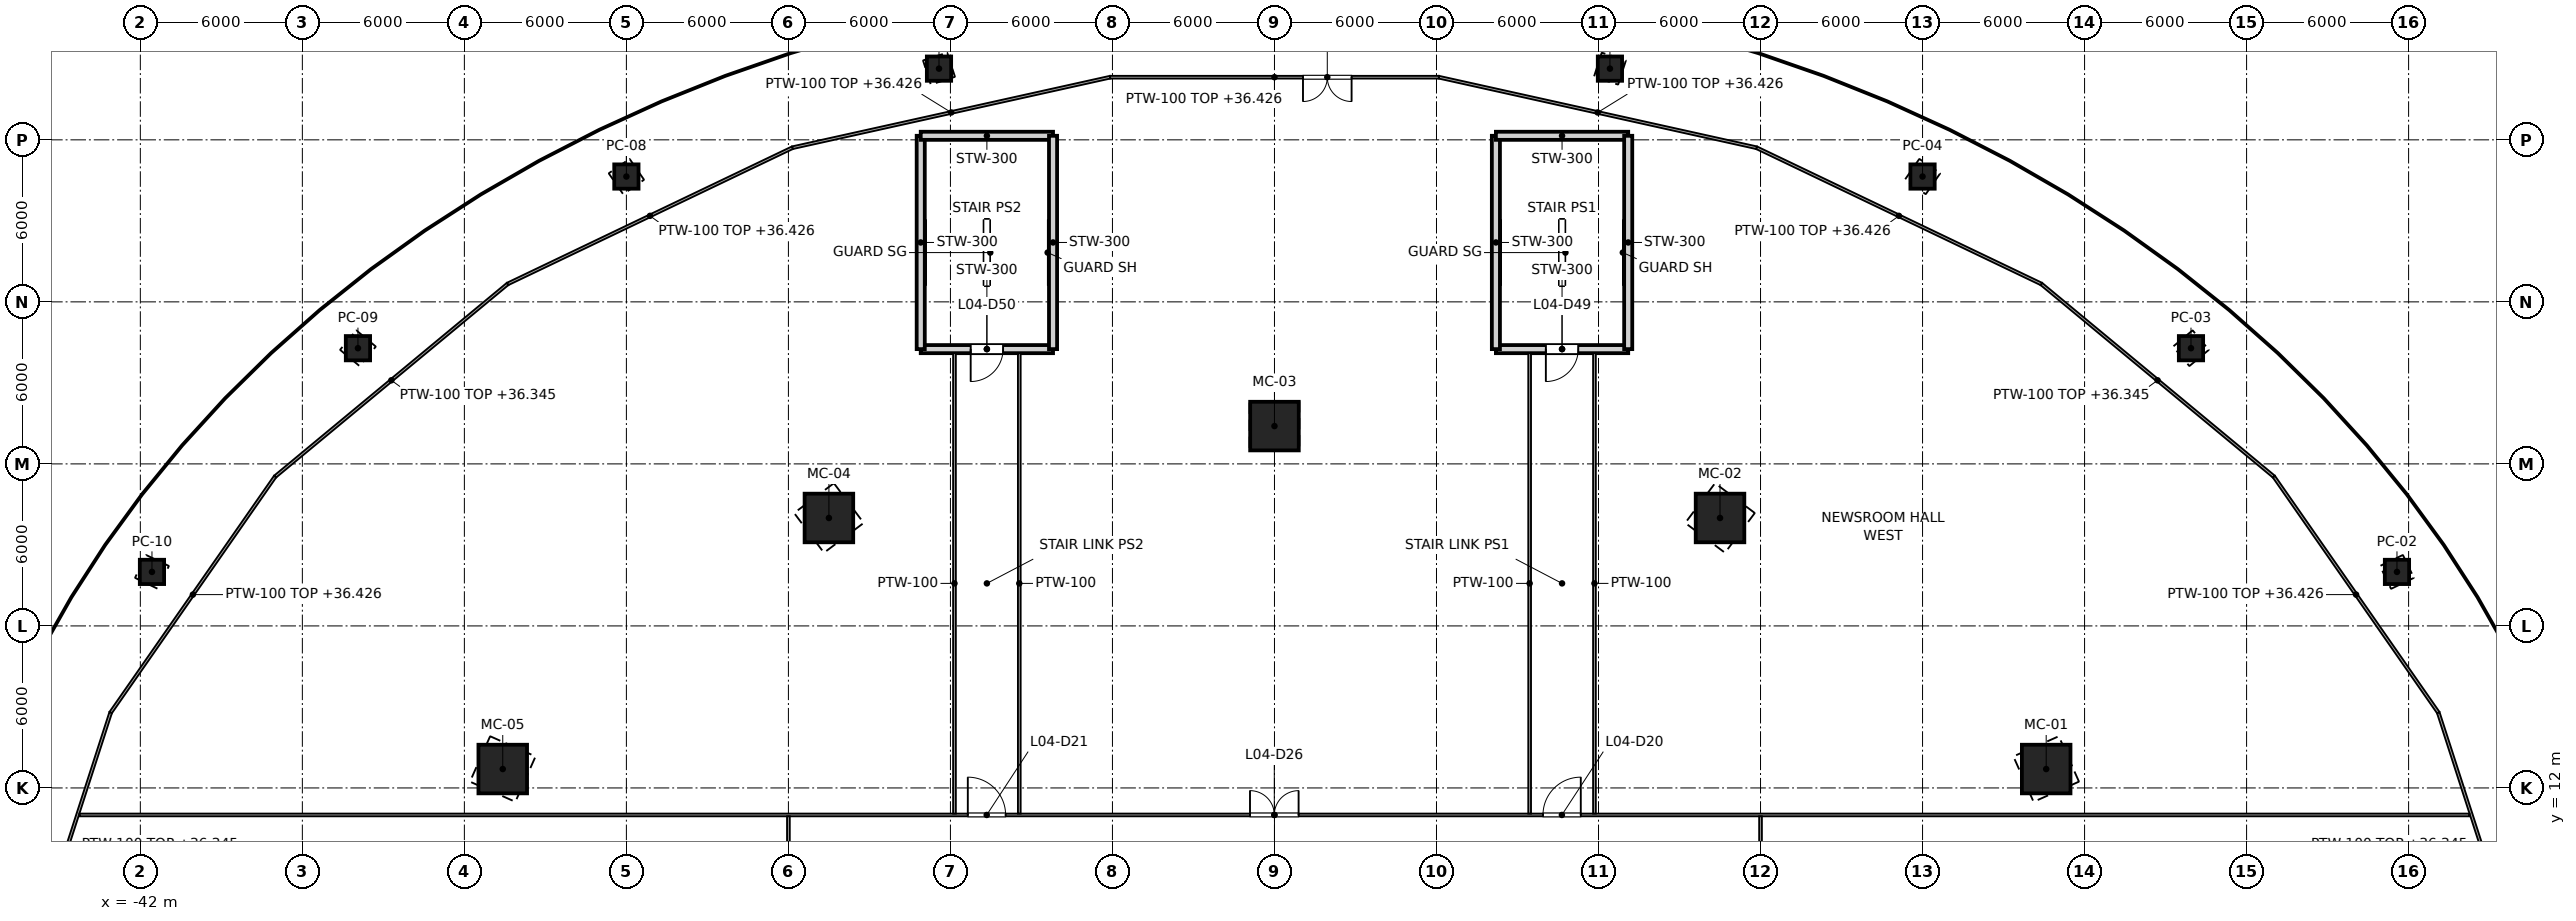
"""IFC4 building model, lengths in metres.
Left out: names, types, materials, properties, quantities, classifications, styles, units other than length and angle.
Written with IfcOpenShell. Run it as: python <this file> out.ifc"""

import sys

from ifc_helpers import new_model, si_unit, direction, frame, frame_2d, origin, origin_2d, place, context, subcontext, project, spatial, rectangle, hollow_rectangle, extrude, element, fill, save


model = new_model("IFC4")
c1 = context("Model", 3, precision=1e-05, world=origin(), true_north=direction((0.0, 1.0)))
c2 = subcontext(c1, "Body", "Model", "MODEL_VIEW")
j1 = project(units=[si_unit("LENGTHUNIT", "METRE"), si_unit("PLANEANGLEUNIT", "RADIAN")], contexts=[c1])
p1 = place(None, origin())
s1 = spatial("IfcSite", under=j1, at=p1, CompositionType="ELEMENT")
p2 = place(p1, origin())
s2 = spatial("IfcBuilding", under=s1, at=p2, CompositionType="ELEMENT")
p3 = place(p2, frame((0.0, 0.0, 31.4)))
s3 = spatial("IfcBuildingStorey", under=s2, at=p3, CompositionType="ELEMENT", Elevation=31.4)
for number, where, z_axis, x_axis in (
    (1, (28.579, 12.7, 0.0), (0.0, 0.0, 1.0), (0.914, 0.406, 0.0)),
    (2, (16.5, 21.997, 0.0), (0.0, 0.0, 1.0), (0.6, 0.8, 0.0)),
    (3, (0.0, 25.4, 0.0), (0.0, 0.0, 1.0), (0.0, 1.0, 0.0)),
    (4, (-16.5, 21.997, 0.0), (0.0, 0.0, 1.0), (-0.6, 0.8, 0.0)),
    (5, (-28.579, 12.7, 0.0), (0.0, 0.0, 1.0), (-0.914, 0.406, 0.0)),
):
    element("IfcColumn", number, at=place(p3, frame(where, z_axis=z_axis, x_axis=x_axis)), inside=s3, PredefinedType="COLUMN", context=c2, shape_type="SweptSolid", body=[
        extrude(hollow_rectangle(XDim=1.8, YDim=1.8, WallThickness=0.08, at=origin_2d()), origin(), (0.0, 0.0, 1.0), 6.0),
    ])
for number, where, z_axis, x_axis in (
    (6, (41.569, 20.0, 0.0), (0.0, 0.0, 1.0), (0.901, 0.434, 0.0)),
    (7, (33.941, 28.284, 0.0), (0.0, 0.0, 1.0), (0.768, 0.64, 0.0)),
    (8, (24.0, 34.641, 0.0), (0.0, 0.0, 1.0), (0.569, 0.822, 0.0)),
    (9, (12.423, 38.637, 0.0), (0.0, 0.0, 1.0), (0.306, 0.952, 0.0)),
    (10, (-12.423, 38.637, 0.0), (0.0, 0.0, 1.0), (-0.306, 0.952, 0.0)),
    (11, (-24.0, 34.641, 0.0), (0.0, 0.0, 1.0), (-0.569, 0.822, 0.0)),
    (12, (-33.941, 28.284, 0.0), (0.0, 0.0, 1.0), (-0.768, 0.64, 0.0)),
    (13, (-41.569, 20.0, 0.0), (0.0, 0.0, 1.0), (-0.901, 0.434, 0.0)),
):
    element("IfcColumn", number, at=place(p3, frame(where, z_axis=z_axis, x_axis=x_axis)), inside=s3, PredefinedType="COLUMN", context=c2, shape_type="SweptSolid", body=[
        extrude(hollow_rectangle(XDim=0.9, YDim=0.9, WallThickness=0.04, at=origin_2d()), origin(), (0.0, 0.0, 1.0), 6.0),
    ])
p4 = place(p3, frame((13.1, 28.25, 0.0), z_axis=(0.0, 0.0, 1.0), x_axis=(-1.0, 0.0, 0.0)))
e14 = element("IfcWall", 14, at=p4, inside=s3, PredefinedType="SOLIDWALL", context=c2, shape_type="SweptSolid", body=[
    extrude(rectangle(XDim=4.9, YDim=0.3, at=frame_2d((2.45, 0.0))), origin(), (0.0, 0.0, 1.0), 5.8),
])
p5 = place(p4, frame((1.85, 0.0, 0.0)))
e15 = element("IfcOpeningElement", 15, at=p5, cuts=e14, PredefinedType="OPENING", context=c2, shape_type="SweptSolid", body=[
    extrude(rectangle(XDim=1.2, YDim=2.1, at=frame_2d((0.6, 1.05))), frame((0.0, 0.15, 0.0), z_axis=(0.0, -1.0, 0.0), x_axis=(1.0, 0.0, 0.0)), (0.0, 0.0, 1.0), 0.3),
])
p6 = place(p3, frame((8.2, 28.25, 0.0), z_axis=(0.0, 0.0, 1.0), x_axis=(0.0, 1.0, 0.0)))
e16 = element("IfcWall", 16, at=p6, inside=s3, PredefinedType="SOLIDWALL", context=c2, shape_type="SweptSolid", body=[
    extrude(rectangle(XDim=7.9, YDim=0.3, at=frame_2d((3.95, 0.0))), origin(), (0.0, 0.0, 1.0), 5.8),
])
p7 = place(p3, frame((8.2, 36.15, 0.0), z_axis=(0.0, 0.0, 1.0), x_axis=(1.0, 0.0, 0.0)))
e17 = element("IfcWall", 17, at=p7, inside=s3, PredefinedType="SOLIDWALL", context=c2, shape_type="SweptSolid", body=[
    extrude(rectangle(XDim=4.9, YDim=0.3, at=frame_2d((2.45, 0.0))), origin(), (0.0, 0.0, 1.0), 5.8),
])
p8 = place(p3, frame((13.1, 36.15, 0.0), z_axis=(0.0, 0.0, 1.0), x_axis=(0.0, -1.0, 0.0)))
e18 = element("IfcWall", 18, at=p8, inside=s3, PredefinedType="SOLIDWALL", context=c2, shape_type="SweptSolid", body=[
    extrude(rectangle(XDim=7.9, YDim=0.3, at=frame_2d((3.95, 0.0))), origin(), (0.0, 0.0, 1.0), 5.8),
])
p9 = place(p3, frame((-8.2, 28.25, 0.0), z_axis=(0.0, 0.0, 1.0), x_axis=(-1.0, 0.0, 0.0)))
e19 = element("IfcWall", 19, at=p9, inside=s3, PredefinedType="SOLIDWALL", context=c2, shape_type="SweptSolid", body=[
    extrude(rectangle(XDim=4.9, YDim=0.3, at=frame_2d((2.45, 0.0))), origin(), (0.0, 0.0, 1.0), 5.8),
])
p10 = place(p9, frame((1.85, 0.0, 0.0)))
e20 = element("IfcOpeningElement", 20, at=p10, cuts=e19, PredefinedType="OPENING", context=c2, shape_type="SweptSolid", body=[
    extrude(rectangle(XDim=1.2, YDim=2.1, at=frame_2d((0.6, 1.05))), frame((0.0, 0.15, 0.0), z_axis=(0.0, -1.0, 0.0), x_axis=(1.0, 0.0, 0.0)), (0.0, 0.0, 1.0), 0.3),
])
p11 = place(p3, frame((-13.1, 28.25, 0.0), z_axis=(0.0, 0.0, 1.0), x_axis=(0.0, 1.0, 0.0)))
e21 = element("IfcWall", 21, at=p11, inside=s3, PredefinedType="SOLIDWALL", context=c2, shape_type="SweptSolid", body=[
    extrude(rectangle(XDim=7.9, YDim=0.3, at=frame_2d((3.95, 0.0))), origin(), (0.0, 0.0, 1.0), 5.8),
])
p12 = place(p3, frame((-13.1, 36.15, 0.0), z_axis=(0.0, 0.0, 1.0), x_axis=(1.0, 0.0, 0.0)))
e22 = element("IfcWall", 22, at=p12, inside=s3, PredefinedType="SOLIDWALL", context=c2, shape_type="SweptSolid", body=[
    extrude(rectangle(XDim=4.9, YDim=0.3, at=frame_2d((2.45, 0.0))), origin(), (0.0, 0.0, 1.0), 5.8),
])
p13 = place(p3, frame((-8.2, 36.15, 0.0), z_axis=(0.0, 0.0, 1.0), x_axis=(0.0, -1.0, 0.0)))
e23 = element("IfcWall", 23, at=p13, inside=s3, PredefinedType="SOLIDWALL", context=c2, shape_type="SweptSolid", body=[
    extrude(rectangle(XDim=7.9, YDim=0.3, at=frame_2d((3.95, 0.0))), origin(), (0.0, 0.0, 1.0), 5.8),
])
p14 = place(p3, frame((46.251, 5.045, 0.0), z_axis=(0.0, 0.0, 1.0), x_axis=(-0.307713034182, 0.951479210805, 0.0)))
e24 = element("IfcWall", 24, at=p14, inside=s3, PredefinedType="PARTITIONING", context=c2, shape_type="SweptSolid", body=[
    extrude(rectangle(XDim=10.243, YDim=0.1, at=frame_2d((5.122, 0.0))), origin(), (0.0, 0.0, 1.0), 4.945),
])
p15 = place(p14, frame((3.2, 0.0, 0.0)))
e25 = element("IfcOpeningElement", 25, at=p15, cuts=e24, PredefinedType="OPENING", context=c2, shape_type="SweptSolid", body=[
    extrude(rectangle(XDim=0.9, YDim=2.1, at=frame_2d((0.45, 1.05))), frame((0.0, 0.05, 0.0), z_axis=(0.0, -1.0, 0.0), x_axis=(1.0, 0.0, 0.0)), (0.0, 0.0, 1.0), 0.1),
])
p16 = place(p3, frame((43.099, 14.791, 0.0), z_axis=(0.0, 0.0, 1.0), x_axis=(-0.571737958261, 0.820436290692, 0.0)))
e26 = element("IfcWall", 26, at=p16, inside=s3, PredefinedType="PARTITIONING", context=c2, shape_type="SweptSolid", body=[
    extrude(rectangle(XDim=10.65, YDim=0.1, at=frame_2d((5.325, 0.0))), origin(), (0.0, 0.0, 1.0), 5.026),
])
p17 = place(p3, frame((37.01, 23.529, 0.0), z_axis=(0.0, 0.0, 1.0), x_axis=(-0.770046995363, 0.637987166746, 0.0)))
e27 = element("IfcWall", 27, at=p17, inside=s3, PredefinedType="PARTITIONING", context=c2, shape_type="SweptSolid", body=[
    extrude(rectangle(XDim=11.183, YDim=0.1, at=frame_2d((5.591, 0.0))), origin(), (0.0, 0.0, 1.0), 4.945),
])
p18 = place(p3, frame((28.399, 30.663, 0.0), z_axis=(0.0, 0.0, 1.0), x_axis=(-0.902100999032, 0.431524955878, 0.0)))
e28 = element("IfcWall", 28, at=p18, inside=s3, PredefinedType="PARTITIONING", context=c2, shape_type="SweptSolid", body=[
    extrude(rectangle(XDim=11.691, YDim=0.1, at=frame_2d((5.845, 0.0))), origin(), (0.0, 0.0, 1.0), 5.026),
])
p19 = place(p3, frame((17.852, 35.708, 0.0), z_axis=(0.0, 0.0, 1.0), x_axis=(-0.97623471049, 0.216715920124, 0.0)))
e29 = element("IfcWall", 29, at=p19, inside=s3, PredefinedType="PARTITIONING", context=c2, shape_type="SweptSolid", body=[
    extrude(rectangle(XDim=12.05, YDim=0.1, at=frame_2d((6.025, 0.0))), origin(), (0.0, 0.0, 1.0), 5.026),
])
p20 = place(p3, frame((6.089, 38.319, 0.0), z_axis=(0.0, 0.0, 1.0), x_axis=(-1.0, 0.0, 0.0)))
e30 = element("IfcWall", 30, at=p20, inside=s3, PredefinedType="PARTITIONING", context=c2, shape_type="SweptSolid", body=[
    extrude(rectangle(XDim=12.178, YDim=0.1, at=frame_2d((6.089, 0.0))), origin(), (0.0, 0.0, 1.0), 5.026),
])
p21 = place(p20, frame((3.233, 0.0, 0.0)))
e31 = element("IfcOpeningElement", 31, at=p21, cuts=e30, PredefinedType="OPENING", context=c2, shape_type="SweptSolid", body=[
    extrude(rectangle(XDim=1.8, YDim=2.1, at=frame_2d((0.9, 1.05))), frame((0.0, 0.05, 0.0), z_axis=(0.0, -1.0, 0.0), x_axis=(1.0, 0.0, 0.0)), (0.0, 0.0, 1.0), 0.1),
])
p22 = place(p3, frame((-6.089, 38.319, 0.0), z_axis=(0.0, 0.0, 1.0), x_axis=(-0.97623471049, -0.216715920124, 0.0)))
e32 = element("IfcWall", 32, at=p22, inside=s3, PredefinedType="PARTITIONING", context=c2, shape_type="SweptSolid", body=[
    extrude(rectangle(XDim=12.05, YDim=0.1, at=frame_2d((6.025, 0.0))), origin(), (0.0, 0.0, 1.0), 5.026),
])
p23 = place(p3, frame((-17.852, 35.708, 0.0), z_axis=(0.0, 0.0, 1.0), x_axis=(-0.902100999032, -0.431524955878, 0.0)))
e33 = element("IfcWall", 33, at=p23, inside=s3, PredefinedType="PARTITIONING", context=c2, shape_type="SweptSolid", body=[
    extrude(rectangle(XDim=11.691, YDim=0.1, at=frame_2d((5.845, 0.0))), origin(), (0.0, 0.0, 1.0), 5.026),
])
p24 = place(p3, frame((-28.399, 30.663, 0.0), z_axis=(0.0, 0.0, 1.0), x_axis=(-0.770046995363, -0.637987166746, 0.0)))
e34 = element("IfcWall", 34, at=p24, inside=s3, PredefinedType="PARTITIONING", context=c2, shape_type="SweptSolid", body=[
    extrude(rectangle(XDim=11.183, YDim=0.1, at=frame_2d((5.591, 0.0))), origin(), (0.0, 0.0, 1.0), 4.945),
])
p25 = place(p3, frame((-37.01, 23.529, 0.0), z_axis=(0.0, 0.0, 1.0), x_axis=(-0.571737958261, -0.820436290692, 0.0)))
e35 = element("IfcWall", 35, at=p25, inside=s3, PredefinedType="PARTITIONING", context=c2, shape_type="SweptSolid", body=[
    extrude(rectangle(XDim=10.65, YDim=0.1, at=frame_2d((5.325, 0.0))), origin(), (0.0, 0.0, 1.0), 5.026),
])
p26 = place(p3, frame((-43.099, 14.791, 0.0), z_axis=(0.0, 0.0, 1.0), x_axis=(-0.307713034182, -0.951479210805, 0.0)))
e36 = element("IfcWall", 36, at=p26, inside=s3, PredefinedType="PARTITIONING", context=c2, shape_type="SweptSolid", body=[
    extrude(rectangle(XDim=10.243, YDim=0.1, at=frame_2d((5.122, 0.0))), origin(), (0.0, 0.0, 1.0), 4.945),
])
p27 = place(p3, frame((-44.256, 11.0, 0.0), z_axis=(0.0, 0.0, 1.0), x_axis=(1.0, 0.0, 0.0)))
e37 = element("IfcWall", 37, at=p27, inside=s3, PredefinedType="PARTITIONING", context=c2, shape_type="SweptSolid", body=[
    extrude(rectangle(XDim=88.512, YDim=0.1, at=frame_2d((44.256, 0.0))), origin(), (0.0, 0.0, 1.0), 4.868),
])
p28 = place(p27, frame((54.2, 0.0, 0.0)))
e38 = element("IfcOpeningElement", 38, at=p28, cuts=e37, PredefinedType="OPENING", context=c2, shape_type="SweptSolid", body=[
    extrude(rectangle(XDim=1.4, YDim=2.1, at=frame_2d((0.7, 1.05))), frame((0.0, 0.05, 0.0), z_axis=(0.0, -1.0, 0.0), x_axis=(1.0, 0.0, 0.0)), (0.0, 0.0, 1.0), 0.1),
])
p29 = place(p27, frame((32.9, 0.0, 0.0)))
e39 = element("IfcOpeningElement", 39, at=p29, cuts=e37, PredefinedType="OPENING", context=c2, shape_type="SweptSolid", body=[
    extrude(rectangle(XDim=1.4, YDim=2.1, at=frame_2d((0.7, 1.05))), frame((0.0, 0.05, 0.0), z_axis=(0.0, -1.0, 0.0), x_axis=(1.0, 0.0, 0.0)), (0.0, 0.0, 1.0), 0.1),
])
p30 = place(p27, frame((43.35, 0.0, 0.0)))
e40 = element("IfcOpeningElement", 40, at=p30, cuts=e37, PredefinedType="OPENING", context=c2, shape_type="SweptSolid", body=[
    extrude(rectangle(XDim=1.8, YDim=2.1, at=frame_2d((0.9, 1.05))), frame((0.0, 0.05, 0.0), z_axis=(0.0, -1.0, 0.0), x_axis=(1.0, 0.0, 0.0)), (0.0, 0.0, 1.0), 0.1),
])
p31 = place(p3, frame((18.0, -10.95, 0.0), z_axis=(0.0, 0.0, 1.0), x_axis=(0.0, 1.0, 0.0)))
e41 = element("IfcWall", 41, at=p31, inside=s3, PredefinedType="PARTITIONING", context=c2, shape_type="SweptSolid", body=[
    extrude(rectangle(XDim=21.9, YDim=0.1, at=frame_2d((10.95, 0.0))), origin(), (0.0, 0.0, 1.0), 4.877),
])
p32 = place(p31, frame((10.25, 0.0, 0.0)))
e42 = element("IfcOpeningElement", 42, at=p32, cuts=e41, PredefinedType="OPENING", context=c2, shape_type="SweptSolid", body=[
    extrude(rectangle(XDim=1.4, YDim=2.1, at=frame_2d((0.7, 1.05))), frame((0.0, 0.05, 0.0), z_axis=(0.0, -1.0, 0.0), x_axis=(1.0, 0.0, 0.0)), (0.0, 0.0, 1.0), 0.1),
])
p33 = place(p31, frame((2.05, 0.0, 0.0)))
e43 = element("IfcOpeningElement", 43, at=p33, cuts=e41, PredefinedType="OPENING", context=c2, shape_type="SweptSolid", body=[
    extrude(rectangle(XDim=1.8, YDim=2.1, at=frame_2d((0.9, 1.05))), frame((0.0, 0.05, 0.0), z_axis=(0.0, -1.0, 0.0), x_axis=(1.0, 0.0, 0.0)), (0.0, 0.0, 1.0), 0.1),
])
p34 = place(p31, frame((7.0, 0.0, 0.0)))
e44 = element("IfcOpeningElement", 44, at=p34, cuts=e41, PredefinedType="OPENING", context=c2, shape_type="SweptSolid", body=[
    extrude(rectangle(XDim=0.9, YDim=2.1, at=frame_2d((0.45, 1.05))), frame((0.0, 0.05, 0.0), z_axis=(0.0, -1.0, 0.0), x_axis=(1.0, 0.0, 0.0)), (0.0, 0.0, 1.0), 0.1),
])
p35 = place(p31, frame((14.45, 0.0, 0.0)))
e45 = element("IfcOpeningElement", 45, at=p35, cuts=e41, PredefinedType="OPENING", context=c2, shape_type="SweptSolid", body=[
    extrude(rectangle(XDim=0.9, YDim=2.1, at=frame_2d((0.45, 1.05))), frame((0.0, 0.05, 0.0), z_axis=(0.0, -1.0, 0.0), x_axis=(1.0, 0.0, 0.0)), (0.0, 0.0, 1.0), 0.1),
])
p36 = place(p31, frame((18.95, 0.0, 0.0)))
e46 = element("IfcOpeningElement", 46, at=p36, cuts=e41, PredefinedType="OPENING", context=c2, shape_type="SweptSolid", body=[
    extrude(rectangle(XDim=0.9, YDim=2.1, at=frame_2d((0.45, 1.05))), frame((0.0, 0.05, 0.0), z_axis=(0.0, -1.0, 0.0), x_axis=(1.0, 0.0, 0.0)), (0.0, 0.0, 1.0), 0.1),
])
p37 = place(p3, frame((-18.0, -10.95, 0.0), z_axis=(0.0, 0.0, 1.0), x_axis=(0.0, 1.0, 0.0)))
e47 = element("IfcWall", 47, at=p37, inside=s3, PredefinedType="PARTITIONING", context=c2, shape_type="SweptSolid", body=[
    extrude(rectangle(XDim=21.9, YDim=0.1, at=frame_2d((10.95, 0.0))), origin(), (0.0, 0.0, 1.0), 4.877),
])
p38 = place(p37, frame((19.75, 0.0, 0.0)))
e48 = element("IfcOpeningElement", 48, at=p38, cuts=e47, PredefinedType="OPENING", context=c2, shape_type="SweptSolid", body=[
    extrude(rectangle(XDim=0.9, YDim=2.1, at=frame_2d((0.45, 1.05))), frame((0.0, 0.05, 0.0), z_axis=(0.0, -1.0, 0.0), x_axis=(1.0, 0.0, 0.0)), (0.0, 0.0, 1.0), 0.1),
])
p39 = place(p37, frame((5.85, 0.0, 0.0)))
e49 = element("IfcOpeningElement", 49, at=p39, cuts=e47, PredefinedType="OPENING", context=c2, shape_type="SweptSolid", body=[
    extrude(rectangle(XDim=0.9, YDim=2.1, at=frame_2d((0.45, 1.05))), frame((0.0, 0.05, 0.0), z_axis=(0.0, -1.0, 0.0), x_axis=(1.0, 0.0, 0.0)), (0.0, 0.0, 1.0), 0.1),
])
p40 = place(p37, frame((10.45, 0.0, 0.0)))
e50 = element("IfcOpeningElement", 50, at=p40, cuts=e47, PredefinedType="OPENING", context=c2, shape_type="SweptSolid", body=[
    extrude(rectangle(XDim=0.9, YDim=2.1, at=frame_2d((0.45, 1.05))), frame((0.0, 0.05, 0.0), z_axis=(0.0, -1.0, 0.0), x_axis=(1.0, 0.0, 0.0)), (0.0, 0.0, 1.0), 0.1),
])
p41 = place(p37, frame((15.05, 0.0, 0.0)))
e51 = element("IfcOpeningElement", 51, at=p41, cuts=e47, PredefinedType="OPENING", context=c2, shape_type="SweptSolid", body=[
    extrude(rectangle(XDim=0.9, YDim=2.1, at=frame_2d((0.45, 1.05))), frame((0.0, 0.05, 0.0), z_axis=(0.0, -1.0, 0.0), x_axis=(1.0, 0.0, 0.0)), (0.0, 0.0, 1.0), 0.1),
])
for number, where, z_axis, x_axis in (
    (52, (9.45, 11.05, 0.0), (0.0, 0.0, 1.0), (0.0, 1.0, 0.0)),
    (53, (11.85, 11.05, 0.0), (0.0, 0.0, 1.0), (0.0, 1.0, 0.0)),
    (54, (-11.85, 11.05, 0.0), (0.0, 0.0, 1.0), (0.0, 1.0, 0.0)),
    (55, (-9.45, 11.05, 0.0), (0.0, 0.0, 1.0), (0.0, 1.0, 0.0)),
):
    element("IfcWall", number, at=place(p3, frame(where, z_axis=z_axis, x_axis=x_axis)), inside=s3, PredefinedType="PARTITIONING", context=c2, shape_type="SweptSolid", body=[
        extrude(rectangle(XDim=17.05, YDim=0.1, at=frame_2d((8.525, 0.0))), origin(), (0.0, 0.0, 1.0), 4.868),
    ])
p42 = place(p28, origin())
e56 = element("IfcDoor", 56, at=p42, inside=s3, OperationType="SINGLE_SWING_RIGHT", PredefinedType="DOOR", context=c2, shape_type="SweptSolid", body=[
    extrude(rectangle(XDim=1.4, YDim=2.1, at=frame_2d((0.7, 1.05))), frame((0.0, 0.025, 0.0), z_axis=(0.0, -1.0, 0.0), x_axis=(1.0, 0.0, 0.0)), (0.0, 0.0, 1.0), 0.05),
])
fill(e38, e56)
p43 = place(p29, origin())
e57 = element("IfcDoor", 57, at=p43, inside=s3, OperationType="SINGLE_SWING_LEFT", PredefinedType="DOOR", context=c2, shape_type="SweptSolid", body=[
    extrude(rectangle(XDim=1.4, YDim=2.1, at=frame_2d((0.7, 1.05))), frame((0.0, 0.025, 0.0), z_axis=(0.0, -1.0, 0.0), x_axis=(1.0, 0.0, 0.0)), (0.0, 0.0, 1.0), 0.05),
])
fill(e39, e57)
p44 = place(p30, origin())
e58 = element("IfcDoor", 58, at=p44, inside=s3, OperationType="DOUBLE_DOOR_SINGLE_SWING", PredefinedType="DOOR", context=c2, shape_type="SweptSolid", body=[
    extrude(rectangle(XDim=1.8, YDim=2.1, at=frame_2d((0.9, 1.05))), frame((0.0, 0.025, 0.0), z_axis=(0.0, -1.0, 0.0), x_axis=(1.0, 0.0, 0.0)), (0.0, 0.0, 1.0), 0.05),
])
fill(e40, e58)
p45 = place(p21, origin())
e59 = element("IfcDoor", 59, at=p45, inside=s3, OperationType="DOUBLE_DOOR_SINGLE_SWING", PredefinedType="DOOR", context=c2, shape_type="SweptSolid", body=[
    extrude(rectangle(XDim=1.8, YDim=2.1, at=frame_2d((0.9, 1.05))), frame((0.0, 0.025, 0.0), z_axis=(0.0, -1.0, 0.0), x_axis=(1.0, 0.0, 0.0)), (0.0, 0.0, 1.0), 0.05),
])
fill(e31, e59)
p46 = place(p5, origin())
e60 = element("IfcDoor", 60, at=p46, inside=s3, OperationType="SINGLE_SWING_RIGHT", PredefinedType="DOOR", context=c2, shape_type="SweptSolid", body=[
    extrude(rectangle(XDim=1.2, YDim=2.1, at=frame_2d((0.6, 1.05))), frame((0.0, 0.025, 0.0), z_axis=(0.0, -1.0, 0.0), x_axis=(1.0, 0.0, 0.0)), (0.0, 0.0, 1.0), 0.05),
])
fill(e15, e60)
p47 = place(p10, origin())
e61 = element("IfcDoor", 61, at=p47, inside=s3, OperationType="SINGLE_SWING_RIGHT", PredefinedType="DOOR", context=c2, shape_type="SweptSolid", body=[
    extrude(rectangle(XDim=1.2, YDim=2.1, at=frame_2d((0.6, 1.05))), frame((0.0, 0.025, 0.0), z_axis=(0.0, -1.0, 0.0), x_axis=(1.0, 0.0, 0.0)), (0.0, 0.0, 1.0), 0.05),
])
fill(e20, e61)
save(model, sys.argv[1])
